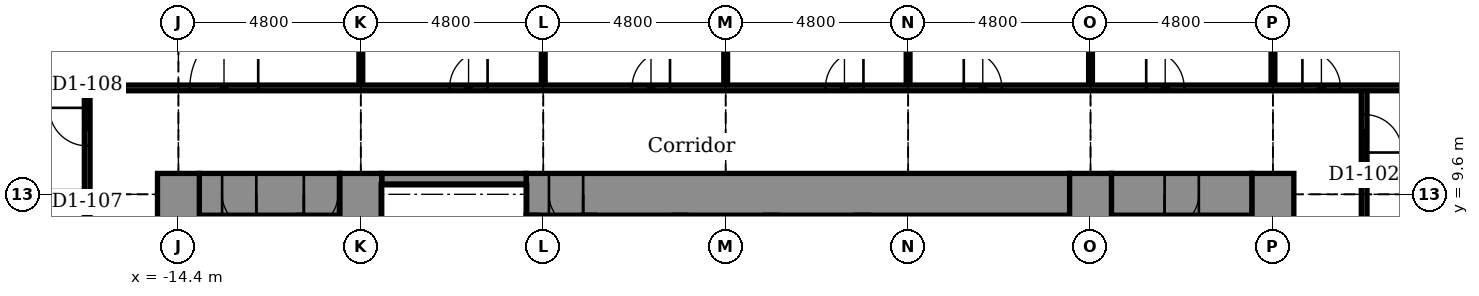
"""IFC4 building model, lengths in metres.
Left out: names, types, materials, properties, quantities, classifications, styles, units other than length and angle.
Written with IfcOpenShell. Run it as: python <this file> out.ifc"""

import sys

from ifc_helpers import new_model, si_unit, direction, frame, frame_2d, origin, place, context, subcontext, project, spatial, rectangle, extrude, element, fill, save


model = new_model("IFC4")
c1 = context("Model", 3, precision=1e-05, world=origin(), true_north=direction((0.0, 1.0)))
c2 = subcontext(c1, "Body", "Model", "MODEL_VIEW")
j1 = project(units=[si_unit("LENGTHUNIT", "METRE"), si_unit("PLANEANGLEUNIT", "RADIAN")], contexts=[c1])
p1 = place(None, origin())
s1 = spatial("IfcSite", under=j1, at=p1, CompositionType="ELEMENT")
p2 = place(p1, origin())
s2 = spatial("IfcBuilding", under=s1, at=p2, CompositionType="ELEMENT")
p3 = place(p2, frame((0.0, 0.0, 38.9)))
s3 = spatial("IfcBuildingStorey", under=s2, at=p3, CompositionType="ELEMENT", Elevation=38.9)
p4 = place(p3, frame((-13.85, 9.6, -0.25), z_axis=(0.0, 0.0, 1.0), x_axis=(1.0, 0.0, 0.0)))
e1 = element("IfcWall", 1, at=p4, inside=s3, PredefinedType="SHEAR", context=c2, shape_type="SweptSolid", body=[
    extrude(rectangle(XDim=3.7, YDim=1.1, at=frame_2d((1.85, 0.0))), origin(), (0.0, 0.0, 1.0), 5.5),
])
p5 = place(p4, frame((0.6, 0.0, 0.25)))
e2 = element("IfcOpeningElement", 2, at=p5, cuts=e1, PredefinedType="OPENING", context=c2, shape_type="SweptSolid", body=[
    extrude(rectangle(XDim=0.9, YDim=2.1, at=frame_2d((0.45, 1.05))), frame((0.0, 0.56, 0.0), z_axis=(0.0, -1.0, 0.0), x_axis=(1.0, 0.0, 0.0)), (0.0, 0.0, 1.0), 1.12),
])
p6 = place(p4, frame((2.75, 0.0, 0.25)))
e3 = element("IfcOpeningElement", 3, at=p6, cuts=e1, PredefinedType="OPENING", context=c2, shape_type="SweptSolid", body=[
    extrude(rectangle(XDim=0.9, YDim=2.1, at=frame_2d((0.45, 1.05))), frame((0.0, 0.56, 0.0), z_axis=(0.0, -1.0, 0.0), x_axis=(1.0, 0.0, 0.0)), (0.0, 0.0, 1.0), 1.12),
])
p7 = place(p3, frame((-5.25, 9.6, -0.25), z_axis=(0.0, 0.0, 1.0), x_axis=(1.0, 0.0, 0.0)))
e4 = element("IfcWall", 4, at=p7, inside=s3, PredefinedType="SHEAR", context=c2, shape_type="SweptSolid", body=[
    extrude(rectangle(XDim=14.3, YDim=1.1, at=frame_2d((7.15, 0.0))), origin(), (0.0, 0.0, 1.0), 5.5),
])
p8 = place(p7, frame((0.6, 0.0, 0.25)))
e5 = element("IfcOpeningElement", 5, at=p8, cuts=e4, PredefinedType="OPENING", context=c2, shape_type="SweptSolid", body=[
    extrude(rectangle(XDim=0.9, YDim=2.1, at=frame_2d((0.45, 1.05))), frame((0.0, 0.56, 0.0), z_axis=(0.0, -1.0, 0.0), x_axis=(1.0, 0.0, 0.0)), (0.0, 0.0, 1.0), 1.12),
])
p9 = place(p3, frame((10.15, 9.6, -0.25), z_axis=(0.0, 0.0, 1.0), x_axis=(1.0, 0.0, 0.0)))
e6 = element("IfcWall", 6, at=p9, inside=s3, PredefinedType="SHEAR", context=c2, shape_type="SweptSolid", body=[
    extrude(rectangle(XDim=3.7, YDim=1.1, at=frame_2d((1.85, 0.0))), origin(), (0.0, 0.0, 1.0), 5.5),
])
p10 = place(p9, frame((1.4, 0.0, 0.25)))
e7 = element("IfcOpeningElement", 7, at=p10, cuts=e6, PredefinedType="OPENING", context=c2, shape_type="SweptSolid", body=[
    extrude(rectangle(XDim=0.9, YDim=2.1, at=frame_2d((0.45, 1.05))), frame((0.0, 0.56, 0.0), z_axis=(0.0, -1.0, 0.0), x_axis=(1.0, 0.0, 0.0)), (0.0, 0.0, 1.0), 1.12),
])
p11 = place(p3, frame((-9.05, 10.0, -0.25), z_axis=(0.0, 0.0, 1.0), x_axis=(1.0, 0.0, 0.0)))
e8 = element("IfcWall", 8, at=p11, inside=s3, PredefinedType="STANDARD", context=c2, shape_type="SweptSolid", body=[
    extrude(rectangle(XDim=3.8, YDim=0.3, at=frame_2d((1.9, 0.0))), origin(), (0.0, 0.0, 1.0), 5.5),
])
p12 = place(p3, frame((-14.4, -10.15, -0.25), z_axis=(0.0, 0.0, 1.0), x_axis=(0.0, 1.0, 0.0)))
e9 = element("IfcWall", 9, at=p12, inside=s3, PredefinedType="SHEAR", context=c2, shape_type="SweptSolid", body=[
    extrude(rectangle(XDim=20.3, YDim=1.1, at=frame_2d((10.15, 0.0))), origin(), (0.0, 0.0, 1.0), 5.5),
])
p13 = place(p12, frame((3.6, 0.0, 0.25)))
e10 = element("IfcOpeningElement", 10, at=p13, cuts=e9, PredefinedType="OPENING", context=c2, shape_type="SweptSolid", body=[
    extrude(rectangle(XDim=1.1, YDim=2.1, at=frame_2d((0.55, 1.05))), frame((0.0, 0.56, 0.0), z_axis=(0.0, -1.0, 0.0), x_axis=(1.0, 0.0, 0.0)), (0.0, 0.0, 1.0), 1.12),
])
p14 = place(p12, frame((6.0, 0.0, 0.25)))
e11 = element("IfcOpeningElement", 11, at=p14, cuts=e9, PredefinedType="OPENING", context=c2, shape_type="SweptSolid", body=[
    extrude(rectangle(XDim=1.1, YDim=2.1, at=frame_2d((0.55, 1.05))), frame((0.0, 0.56, 0.0), z_axis=(0.0, -1.0, 0.0), x_axis=(1.0, 0.0, 0.0)), (0.0, 0.0, 1.0), 1.12),
])
p15 = place(p12, frame((8.4, 0.0, 0.25)))
e12 = element("IfcOpeningElement", 12, at=p15, cuts=e9, PredefinedType="OPENING", context=c2, shape_type="SweptSolid", body=[
    extrude(rectangle(XDim=1.1, YDim=2.1, at=frame_2d((0.55, 1.05))), frame((0.0, 0.56, 0.0), z_axis=(0.0, -1.0, 0.0), x_axis=(1.0, 0.0, 0.0)), (0.0, 0.0, 1.0), 1.12),
])
p16 = place(p12, frame((10.8, 0.0, 0.25)))
e13 = element("IfcOpeningElement", 13, at=p16, cuts=e9, PredefinedType="OPENING", context=c2, shape_type="SweptSolid", body=[
    extrude(rectangle(XDim=1.1, YDim=2.1, at=frame_2d((0.55, 1.05))), frame((0.0, 0.56, 0.0), z_axis=(0.0, -1.0, 0.0), x_axis=(1.0, 0.0, 0.0)), (0.0, 0.0, 1.0), 1.12),
])
p17 = place(p3, frame((-9.6, 2.55, -0.25), z_axis=(0.0, 0.0, 1.0), x_axis=(0.0, 1.0, 0.0)))
e14 = element("IfcWall", 14, at=p17, inside=s3, PredefinedType="SHEAR", context=c2, shape_type="SweptSolid", body=[
    extrude(rectangle(XDim=7.6, YDim=1.1, at=frame_2d((3.8, 0.0))), origin(), (0.0, 0.0, 1.0), 5.5),
])
p18 = place(p3, frame((-5.1, 2.25, -0.25), z_axis=(0.0, 0.0, 1.0), x_axis=(0.0, 1.0, 0.0)))
e15 = element("IfcWall", 15, at=p18, inside=s3, PredefinedType="STANDARD", context=c2, shape_type="SweptSolid", body=[
    extrude(rectangle(XDim=6.8, YDim=0.3, at=frame_2d((3.4, 0.0))), origin(), (0.0, 0.0, 1.0), 5.5),
])
p19 = place(p18, frame((2.0, 0.0, 0.25)))
e16 = element("IfcOpeningElement", 16, at=p19, cuts=e15, PredefinedType="OPENING", context=c2, shape_type="SweptSolid", body=[
    extrude(rectangle(XDim=1.2, YDim=2.1, at=frame_2d((0.6, 1.05))), frame((0.0, 0.16, 0.0), z_axis=(0.0, -1.0, 0.0), x_axis=(1.0, 0.0, 0.0)), (0.0, 0.0, 1.0), 0.32),
])
for number, where, z_axis, x_axis in (
    (17, (-3.6, 5.85, -0.25), (0.0, 0.0, 1.0), (0.0, 1.0, 0.0)),
    (18, (-1.2, 5.85, -0.25), (0.0, 0.0, 1.0), (0.0, 1.0, 0.0)),
    (19, (1.2, 5.85, -0.25), (0.0, 0.0, 1.0), (0.0, 1.0, 0.0)),
    (20, (3.6, 5.85, -0.25), (0.0, 0.0, 1.0), (0.0, 1.0, 0.0)),
):
    element("IfcWall", number, at=place(p3, frame(where, z_axis=z_axis, x_axis=x_axis)), inside=s3, PredefinedType="STANDARD", context=c2, shape_type="SweptSolid", body=[
        extrude(rectangle(XDim=3.2, YDim=0.3, at=frame_2d((1.6, 0.0))), origin(), (0.0, 0.0, 1.0), 5.5),
    ])
p20 = place(p3, frame((9.6, -10.15, -0.25), z_axis=(0.0, 0.0, 1.0), x_axis=(0.0, 1.0, 0.0)))
e21 = element("IfcWall", 21, at=p20, inside=s3, PredefinedType="SHEAR", context=c2, shape_type="SweptSolid", body=[
    extrude(rectangle(XDim=20.3, YDim=1.1, at=frame_2d((10.15, 0.0))), origin(), (0.0, 0.0, 1.0), 5.5),
])
p21 = place(p3, frame((14.4, -10.15, -0.25), z_axis=(0.0, 0.0, 1.0), x_axis=(0.0, 1.0, 0.0)))
e22 = element("IfcWall", 22, at=p21, inside=s3, PredefinedType="SHEAR", context=c2, shape_type="SweptSolid", body=[
    extrude(rectangle(XDim=20.3, YDim=1.1, at=frame_2d((10.15, 0.0))), origin(), (0.0, 0.0, 1.0), 5.5),
])
p22 = place(p21, frame((3.6, 0.0, 0.25)))
e23 = element("IfcOpeningElement", 23, at=p22, cuts=e22, PredefinedType="OPENING", context=c2, shape_type="SweptSolid", body=[
    extrude(rectangle(XDim=1.1, YDim=2.1, at=frame_2d((0.55, 1.05))), frame((0.0, 0.56, 0.0), z_axis=(0.0, -1.0, 0.0), x_axis=(1.0, 0.0, 0.0)), (0.0, 0.0, 1.0), 1.12),
])
p23 = place(p21, frame((6.0, 0.0, 0.25)))
e24 = element("IfcOpeningElement", 24, at=p23, cuts=e22, PredefinedType="OPENING", context=c2, shape_type="SweptSolid", body=[
    extrude(rectangle(XDim=1.1, YDim=2.1, at=frame_2d((0.55, 1.05))), frame((0.0, 0.56, 0.0), z_axis=(0.0, -1.0, 0.0), x_axis=(1.0, 0.0, 0.0)), (0.0, 0.0, 1.0), 1.12),
])
p24 = place(p21, frame((8.4, 0.0, 0.25)))
e25 = element("IfcOpeningElement", 25, at=p24, cuts=e22, PredefinedType="OPENING", context=c2, shape_type="SweptSolid", body=[
    extrude(rectangle(XDim=1.1, YDim=2.1, at=frame_2d((0.55, 1.05))), frame((0.0, 0.56, 0.0), z_axis=(0.0, -1.0, 0.0), x_axis=(1.0, 0.0, 0.0)), (0.0, 0.0, 1.0), 1.12),
])
p25 = place(p21, frame((10.8, 0.0, 0.25)))
e26 = element("IfcOpeningElement", 26, at=p25, cuts=e22, PredefinedType="OPENING", context=c2, shape_type="SweptSolid", body=[
    extrude(rectangle(XDim=1.1, YDim=2.1, at=frame_2d((0.55, 1.05))), frame((0.0, 0.56, 0.0), z_axis=(0.0, -1.0, 0.0), x_axis=(1.0, 0.0, 0.0)), (0.0, 0.0, 1.0), 1.12),
])
p26 = place(p3, frame((16.8, 3.95, 0.0), z_axis=(0.0, 0.0, 1.0), x_axis=(0.0, 1.0, 0.0)))
e27 = element("IfcWall", 27, at=p26, inside=s3, PredefinedType="PARTITIONING", context=c2, shape_type="SweptSolid", body=[
    extrude(rectangle(XDim=8.45, YDim=0.15, at=frame_2d((4.225, 0.0))), origin(), (0.0, 0.0, 1.0), 5.25),
])
p27 = place(p26, frame((2.25, 0.0, 0.0)))
e28 = element("IfcOpeningElement", 28, at=p27, cuts=e27, PredefinedType="OPENING", context=c2, shape_type="SweptSolid", body=[
    extrude(rectangle(XDim=1.0, YDim=2.1, at=frame_2d((0.5, 1.05))), frame((0.0, 0.085, 0.0), z_axis=(0.0, -1.0, 0.0), x_axis=(1.0, 0.0, 0.0)), (0.0, 0.0, 1.0), 0.17),
])
p28 = place(p26, frame((6.75, 0.0, 0.0)))
e29 = element("IfcOpeningElement", 29, at=p28, cuts=e27, PredefinedType="OPENING", context=c2, shape_type="SweptSolid", body=[
    extrude(rectangle(XDim=1.0, YDim=2.1, at=frame_2d((0.5, 1.05))), frame((0.0, 0.085, 0.0), z_axis=(0.0, -1.0, 0.0), x_axis=(1.0, 0.0, 0.0)), (0.0, 0.0, 1.0), 0.17),
])
p29 = place(p3, frame((14.4, 12.4, 0.0), z_axis=(0.0, 0.0, 1.0), x_axis=(0.0, 1.0, 0.0)))
e30 = element("IfcWall", 30, at=p29, inside=s3, PredefinedType="PARTITIONING", context=c2, shape_type="SweptSolid", body=[
    extrude(rectangle(XDim=6.713, YDim=0.1, at=frame_2d((3.356, 0.0))), origin(), (0.0, 0.0, 1.0), 4.793),
])
p30 = place(p3, frame((9.6, 12.4, 0.0), z_axis=(0.0, 0.0, 1.0), x_axis=(0.0, 1.0, 0.0)))
e31 = element("IfcWall", 31, at=p30, inside=s3, PredefinedType="PARTITIONING", context=c2, shape_type="SweptSolid", body=[
    extrude(rectangle(XDim=6.2, YDim=0.1, at=frame_2d((3.1, 0.0))), origin(), (0.0, 0.0, 1.0), 4.793),
])
p31 = place(p3, frame((4.8, 12.4, 0.0), z_axis=(0.0, 0.0, 1.0), x_axis=(0.0, 1.0, 0.0)))
e32 = element("IfcWall", 32, at=p31, inside=s3, PredefinedType="PARTITIONING", context=c2, shape_type="SweptSolid", body=[
    extrude(rectangle(XDim=6.713, YDim=0.1, at=frame_2d((3.356, 0.0))), origin(), (0.0, 0.0, 1.0), 4.793),
])
p32 = place(p3, frame((0.0, 12.4, 0.0), z_axis=(0.0, 0.0, 1.0), x_axis=(0.0, 1.0, 0.0)))
e33 = element("IfcWall", 33, at=p32, inside=s3, PredefinedType="PARTITIONING", context=c2, shape_type="SweptSolid", body=[
    extrude(rectangle(XDim=6.2, YDim=0.1, at=frame_2d((3.1, 0.0))), origin(), (0.0, 0.0, 1.0), 4.793),
])
p33 = place(p3, frame((-4.8, 12.4, 0.0), z_axis=(0.0, 0.0, 1.0), x_axis=(0.0, 1.0, 0.0)))
e34 = element("IfcWall", 34, at=p33, inside=s3, PredefinedType="PARTITIONING", context=c2, shape_type="SweptSolid", body=[
    extrude(rectangle(XDim=6.713, YDim=0.1, at=frame_2d((3.356, 0.0))), origin(), (0.0, 0.0, 1.0), 4.793),
])
p34 = place(p3, frame((-9.6, 12.4, 0.0), z_axis=(0.0, 0.0, 1.0), x_axis=(0.0, 1.0, 0.0)))
e35 = element("IfcWall", 35, at=p34, inside=s3, PredefinedType="PARTITIONING", context=c2, shape_type="SweptSolid", body=[
    extrude(rectangle(XDim=6.2, YDim=0.1, at=frame_2d((3.1, 0.0))), origin(), (0.0, 0.0, 1.0), 4.793),
])
p35 = place(p3, frame((-11.2, 7.35, 0.0), z_axis=(0.0, 0.0, 1.0), x_axis=(0.0, 1.0, 0.0)))
e36 = element("IfcWall", 36, at=p35, inside=s3, PredefinedType="PARTITIONING", context=c2, shape_type="SweptSolid", body=[
    extrude(rectangle(XDim=1.7, YDim=0.1, at=frame_2d((0.85, 0.0))), origin(), (0.0, 0.0, 1.0), 5.25),
])
p36 = place(p3, frame((-16.8, 3.95, 0.0), z_axis=(0.0, 0.0, 1.0), x_axis=(0.0, 1.0, 0.0)))
e37 = element("IfcWall", 37, at=p36, inside=s3, PredefinedType="PARTITIONING", context=c2, shape_type="SweptSolid", body=[
    extrude(rectangle(XDim=8.45, YDim=0.15, at=frame_2d((4.225, 0.0))), origin(), (0.0, 0.0, 1.0), 5.25),
])
p37 = place(p36, frame((0.95, 0.0, 0.0)))
e38 = element("IfcOpeningElement", 38, at=p37, cuts=e37, PredefinedType="OPENING", context=c2, shape_type="SweptSolid", body=[
    extrude(rectangle(XDim=1.0, YDim=2.1, at=frame_2d((0.5, 1.05))), frame((0.0, 0.085, 0.0), z_axis=(0.0, -1.0, 0.0), x_axis=(1.0, 0.0, 0.0)), (0.0, 0.0, 1.0), 0.17),
])
p38 = place(p36, frame((3.85, 0.0, 0.0)))
e39 = element("IfcOpeningElement", 39, at=p38, cuts=e37, PredefinedType="OPENING", context=c2, shape_type="SweptSolid", body=[
    extrude(rectangle(XDim=1.0, YDim=2.1, at=frame_2d((0.5, 1.05))), frame((0.0, 0.085, 0.0), z_axis=(0.0, -1.0, 0.0), x_axis=(1.0, 0.0, 0.0)), (0.0, 0.0, 1.0), 0.17),
])
p39 = place(p36, frame((6.925, 0.0, 0.0)))
e40 = element("IfcOpeningElement", 40, at=p39, cuts=e37, PredefinedType="OPENING", context=c2, shape_type="SweptSolid", body=[
    extrude(rectangle(XDim=1.0, YDim=2.1, at=frame_2d((0.5, 1.05))), frame((0.0, 0.085, 0.0), z_axis=(0.0, -1.0, 0.0), x_axis=(1.0, 0.0, 0.0)), (0.0, 0.0, 1.0), 0.17),
])
p40 = place(p3, frame((-18.6, 9.6, 0.0), z_axis=(0.0, 0.0, 1.0), x_axis=(1.0, 0.0, 0.0)))
e41 = element("IfcWall", 41, at=p40, inside=s3, PredefinedType="PARTITIONING", context=c2, shape_type="SweptSolid", body=[
    extrude(rectangle(XDim=1.8, YDim=0.15, at=frame_2d((0.9, 0.0))), origin(), (0.0, 0.0, 1.0), 4.642),
])
p41 = place(p3, frame((16.8, 10.0, 0.0), z_axis=(0.0, 0.0, 1.0), x_axis=(1.0, 0.0, 0.0)))
e42 = element("IfcWall", 42, at=p41, inside=s3, PredefinedType="PARTITIONING", context=c2, shape_type="SweptSolid", body=[
    extrude(rectangle(XDim=1.8, YDim=0.15, at=frame_2d((0.9, 0.0))), origin(), (0.0, 0.0, 1.0), 5.25),
])
p42 = place(p3, frame((-21.6, 12.4, 0.0), z_axis=(0.0, 0.0, 1.0), x_axis=(1.0, 0.0, 0.0)))
e43 = element("IfcWall", 43, at=p42, inside=s3, PredefinedType="PARTITIONING", context=c2, shape_type="SweptSolid", body=[
    extrude(rectangle(XDim=4.8, YDim=0.1, at=frame_2d((2.4, 0.0))), origin(), (0.0, 0.0, 1.0), 5.25),
])
p43 = place(p3, frame((-16.8, 12.4, 0.0), z_axis=(0.0, 0.0, 1.0), x_axis=(1.0, 0.0, 0.0)))
e44 = element("IfcWall", 44, at=p43, inside=s3, PredefinedType="PARTITIONING", context=c2, shape_type="SweptSolid", body=[
    extrude(rectangle(XDim=38.4, YDim=0.15, at=frame_2d((19.2, 0.0))), origin(), (0.0, 0.0, 1.0), 5.25),
])
p44 = place(p43, frame((2.7, 0.0, 0.0)))
e45 = element("IfcOpeningElement", 45, at=p44, cuts=e44, PredefinedType="OPENING", context=c2, shape_type="SweptSolid", body=[
    extrude(rectangle(XDim=1.8, YDim=2.1, at=frame_2d((0.9, 1.05))), frame((0.0, 0.085, 0.0), z_axis=(0.0, -1.0, 0.0), x_axis=(1.0, 0.0, 0.0)), (0.0, 0.0, 1.0), 0.17),
])
p45 = place(p43, frame((9.535, 0.0, 0.0)))
e46 = element("IfcOpeningElement", 46, at=p45, cuts=e44, PredefinedType="OPENING", context=c2, shape_type="SweptSolid", body=[
    extrude(rectangle(XDim=1.0, YDim=2.1, at=frame_2d((0.5, 1.05))), frame((0.0, 0.085, 0.0), z_axis=(0.0, -1.0, 0.0), x_axis=(1.0, 0.0, 0.0)), (0.0, 0.0, 1.0), 0.17),
])
p46 = place(p43, frame((14.335, 0.0, 0.0)))
e47 = element("IfcOpeningElement", 47, at=p46, cuts=e44, PredefinedType="OPENING", context=c2, shape_type="SweptSolid", body=[
    extrude(rectangle(XDim=1.0, YDim=2.1, at=frame_2d((0.5, 1.05))), frame((0.0, 0.085, 0.0), z_axis=(0.0, -1.0, 0.0), x_axis=(1.0, 0.0, 0.0)), (0.0, 0.0, 1.0), 0.17),
])
p47 = place(p43, frame((19.425, 0.0, 0.0)))
e48 = element("IfcOpeningElement", 48, at=p47, cuts=e44, PredefinedType="OPENING", context=c2, shape_type="SweptSolid", body=[
    extrude(rectangle(XDim=1.0, YDim=2.1, at=frame_2d((0.5, 1.05))), frame((0.0, 0.085, 0.0), z_axis=(0.0, -1.0, 0.0), x_axis=(1.0, 0.0, 0.0)), (0.0, 0.0, 1.0), 0.17),
])
p48 = place(p43, frame((23.065, 0.0, 0.0)))
e49 = element("IfcOpeningElement", 49, at=p48, cuts=e44, PredefinedType="OPENING", context=c2, shape_type="SweptSolid", body=[
    extrude(rectangle(XDim=1.0, YDim=2.1, at=frame_2d((0.5, 1.05))), frame((0.0, 0.085, 0.0), z_axis=(0.0, -1.0, 0.0), x_axis=(1.0, 0.0, 0.0)), (0.0, 0.0, 1.0), 0.17),
])
p49 = place(p43, frame((27.865, 0.0, 0.0)))
e50 = element("IfcOpeningElement", 50, at=p49, cuts=e44, PredefinedType="OPENING", context=c2, shape_type="SweptSolid", body=[
    extrude(rectangle(XDim=1.0, YDim=2.1, at=frame_2d((0.5, 1.05))), frame((0.0, 0.085, 0.0), z_axis=(0.0, -1.0, 0.0), x_axis=(1.0, 0.0, 0.0)), (0.0, 0.0, 1.0), 0.17),
])
p50 = place(p43, frame((31.975, 0.0, 0.0)))
e51 = element("IfcOpeningElement", 51, at=p50, cuts=e44, PredefinedType="OPENING", context=c2, shape_type="SweptSolid", body=[
    extrude(rectangle(XDim=1.0, YDim=2.1, at=frame_2d((0.5, 1.05))), frame((0.0, 0.085, 0.0), z_axis=(0.0, -1.0, 0.0), x_axis=(1.0, 0.0, 0.0)), (0.0, 0.0, 1.0), 0.17),
])
p51 = place(p44, origin())
e52 = element("IfcDoor", 52, at=p51, inside=s3, OperationType="SINGLE_SWING_RIGHT", PredefinedType="DOOR", context=c2, shape_type="SweptSolid", body=[
    extrude(rectangle(XDim=1.8, YDim=2.1, at=frame_2d((0.9, 1.05))), frame((0.0, 0.025, 0.0), z_axis=(0.0, -1.0, 0.0), x_axis=(1.0, 0.0, 0.0)), (0.0, 0.0, 1.0), 0.05),
])
fill(e45, e52)
p52 = place(p45, origin())
e53 = element("IfcDoor", 53, at=p52, inside=s3, OperationType="SINGLE_SWING_RIGHT", PredefinedType="DOOR", context=c2, shape_type="SweptSolid", body=[
    extrude(rectangle(XDim=1.0, YDim=2.1, at=frame_2d((0.5, 1.05))), frame((0.0, 0.025, 0.0), z_axis=(0.0, -1.0, 0.0), x_axis=(1.0, 0.0, 0.0)), (0.0, 0.0, 1.0), 0.05),
])
fill(e46, e53)
p53 = place(p46, origin())
e54 = element("IfcDoor", 54, at=p53, inside=s3, OperationType="SINGLE_SWING_RIGHT", PredefinedType="DOOR", context=c2, shape_type="SweptSolid", body=[
    extrude(rectangle(XDim=1.0, YDim=2.1, at=frame_2d((0.5, 1.05))), frame((0.0, 0.025, 0.0), z_axis=(0.0, -1.0, 0.0), x_axis=(1.0, 0.0, 0.0)), (0.0, 0.0, 1.0), 0.05),
])
fill(e47, e54)
p54 = place(p47, origin())
e55 = element("IfcDoor", 55, at=p54, inside=s3, OperationType="SINGLE_SWING_RIGHT", PredefinedType="DOOR", context=c2, shape_type="SweptSolid", body=[
    extrude(rectangle(XDim=1.0, YDim=2.1, at=frame_2d((0.5, 1.05))), frame((0.0, 0.025, 0.0), z_axis=(0.0, -1.0, 0.0), x_axis=(1.0, 0.0, 0.0)), (0.0, 0.0, 1.0), 0.05),
])
fill(e48, e55)
p55 = place(p48, origin())
e56 = element("IfcDoor", 56, at=p55, inside=s3, OperationType="SINGLE_SWING_LEFT", PredefinedType="DOOR", context=c2, shape_type="SweptSolid", body=[
    extrude(rectangle(XDim=1.0, YDim=2.1, at=frame_2d((0.5, 1.05))), frame((0.0, 0.025, 0.0), z_axis=(0.0, -1.0, 0.0), x_axis=(1.0, 0.0, 0.0)), (0.0, 0.0, 1.0), 0.05),
])
fill(e49, e56)
p56 = place(p49, origin())
e57 = element("IfcDoor", 57, at=p56, inside=s3, OperationType="SINGLE_SWING_LEFT", PredefinedType="DOOR", context=c2, shape_type="SweptSolid", body=[
    extrude(rectangle(XDim=1.0, YDim=2.1, at=frame_2d((0.5, 1.05))), frame((0.0, 0.025, 0.0), z_axis=(0.0, -1.0, 0.0), x_axis=(1.0, 0.0, 0.0)), (0.0, 0.0, 1.0), 0.05),
])
fill(e50, e57)
p57 = place(p50, origin())
e58 = element("IfcDoor", 58, at=p57, inside=s3, OperationType="SINGLE_SWING_LEFT", PredefinedType="DOOR", context=c2, shape_type="SweptSolid", body=[
    extrude(rectangle(XDim=1.0, YDim=2.1, at=frame_2d((0.5, 1.05))), frame((0.0, 0.025, 0.0), z_axis=(0.0, -1.0, 0.0), x_axis=(1.0, 0.0, 0.0)), (0.0, 0.0, 1.0), 0.05),
])
fill(e51, e58)
p58 = place(p28, frame((1.0, 0.0, 0.0), z_axis=(0.0, 0.0, 1.0), x_axis=(-1.0, 0.0, 0.0)))
e59 = element("IfcDoor", 59, at=p58, inside=s3, OperationType="SINGLE_SWING_LEFT", PredefinedType="DOOR", context=c2, shape_type="SweptSolid", body=[
    extrude(rectangle(XDim=1.0, YDim=2.1, at=frame_2d((0.5, 1.05))), frame((0.0, 0.025, 0.0), z_axis=(0.0, -1.0, 0.0), x_axis=(1.0, 0.0, 0.0)), (0.0, 0.0, 1.0), 0.05),
])
fill(e29, e59)
p59 = place(p39, origin())
e60 = element("IfcDoor", 60, at=p59, inside=s3, OperationType="SINGLE_SWING_RIGHT", PredefinedType="DOOR", context=c2, shape_type="SweptSolid", body=[
    extrude(rectangle(XDim=1.0, YDim=2.1, at=frame_2d((0.5, 1.05))), frame((0.0, 0.025, 0.0), z_axis=(0.0, -1.0, 0.0), x_axis=(1.0, 0.0, 0.0)), (0.0, 0.0, 1.0), 0.05),
])
fill(e40, e60)
p60 = place(p10, frame((0.9, 0.0, 0.0), z_axis=(0.0, 0.0, 1.0), x_axis=(-1.0, 0.0, 0.0)))
e61 = element("IfcDoor", 61, at=p60, inside=s3, OperationType="SINGLE_SWING_LEFT", PredefinedType="DOOR", context=c2, shape_type="SweptSolid", body=[
    extrude(rectangle(XDim=0.9, YDim=2.1, at=frame_2d((0.45, 1.05))), frame((0.0, 0.025, 0.0), z_axis=(0.0, -1.0, 0.0), x_axis=(1.0, 0.0, 0.0)), (0.0, 0.0, 1.0), 0.05),
])
fill(e7, e61)
p61 = place(p5, frame((0.9, 0.0, 0.0), z_axis=(0.0, 0.0, 1.0), x_axis=(-1.0, 0.0, 0.0)))
e62 = element("IfcDoor", 62, at=p61, inside=s3, OperationType="SINGLE_SWING_RIGHT", PredefinedType="DOOR", context=c2, shape_type="SweptSolid", body=[
    extrude(rectangle(XDim=0.9, YDim=2.1, at=frame_2d((0.45, 1.05))), frame((0.0, 0.025, 0.0), z_axis=(0.0, -1.0, 0.0), x_axis=(1.0, 0.0, 0.0)), (0.0, 0.0, 1.0), 0.05),
])
fill(e2, e62)
p62 = place(p6, frame((0.9, 0.0, 0.0), z_axis=(0.0, 0.0, 1.0), x_axis=(-1.0, 0.0, 0.0)))
e63 = element("IfcDoor", 63, at=p62, inside=s3, OperationType="SINGLE_SWING_LEFT", PredefinedType="DOOR", context=c2, shape_type="SweptSolid", body=[
    extrude(rectangle(XDim=0.9, YDim=2.1, at=frame_2d((0.45, 1.05))), frame((0.0, 0.025, 0.0), z_axis=(0.0, -1.0, 0.0), x_axis=(1.0, 0.0, 0.0)), (0.0, 0.0, 1.0), 0.05),
])
fill(e3, e63)
p63 = place(p8, frame((0.9, 0.0, 0.0), z_axis=(0.0, 0.0, 1.0), x_axis=(-1.0, 0.0, 0.0)))
e64 = element("IfcDoor", 64, at=p63, inside=s3, OperationType="SINGLE_SWING_RIGHT", PredefinedType="DOOR", context=c2, shape_type="SweptSolid", body=[
    extrude(rectangle(XDim=0.9, YDim=2.1, at=frame_2d((0.45, 1.05))), frame((0.0, 0.025, 0.0), z_axis=(0.0, -1.0, 0.0), x_axis=(1.0, 0.0, 0.0)), (0.0, 0.0, 1.0), 0.05),
])
fill(e5, e64)
save(model, sys.argv[1])
